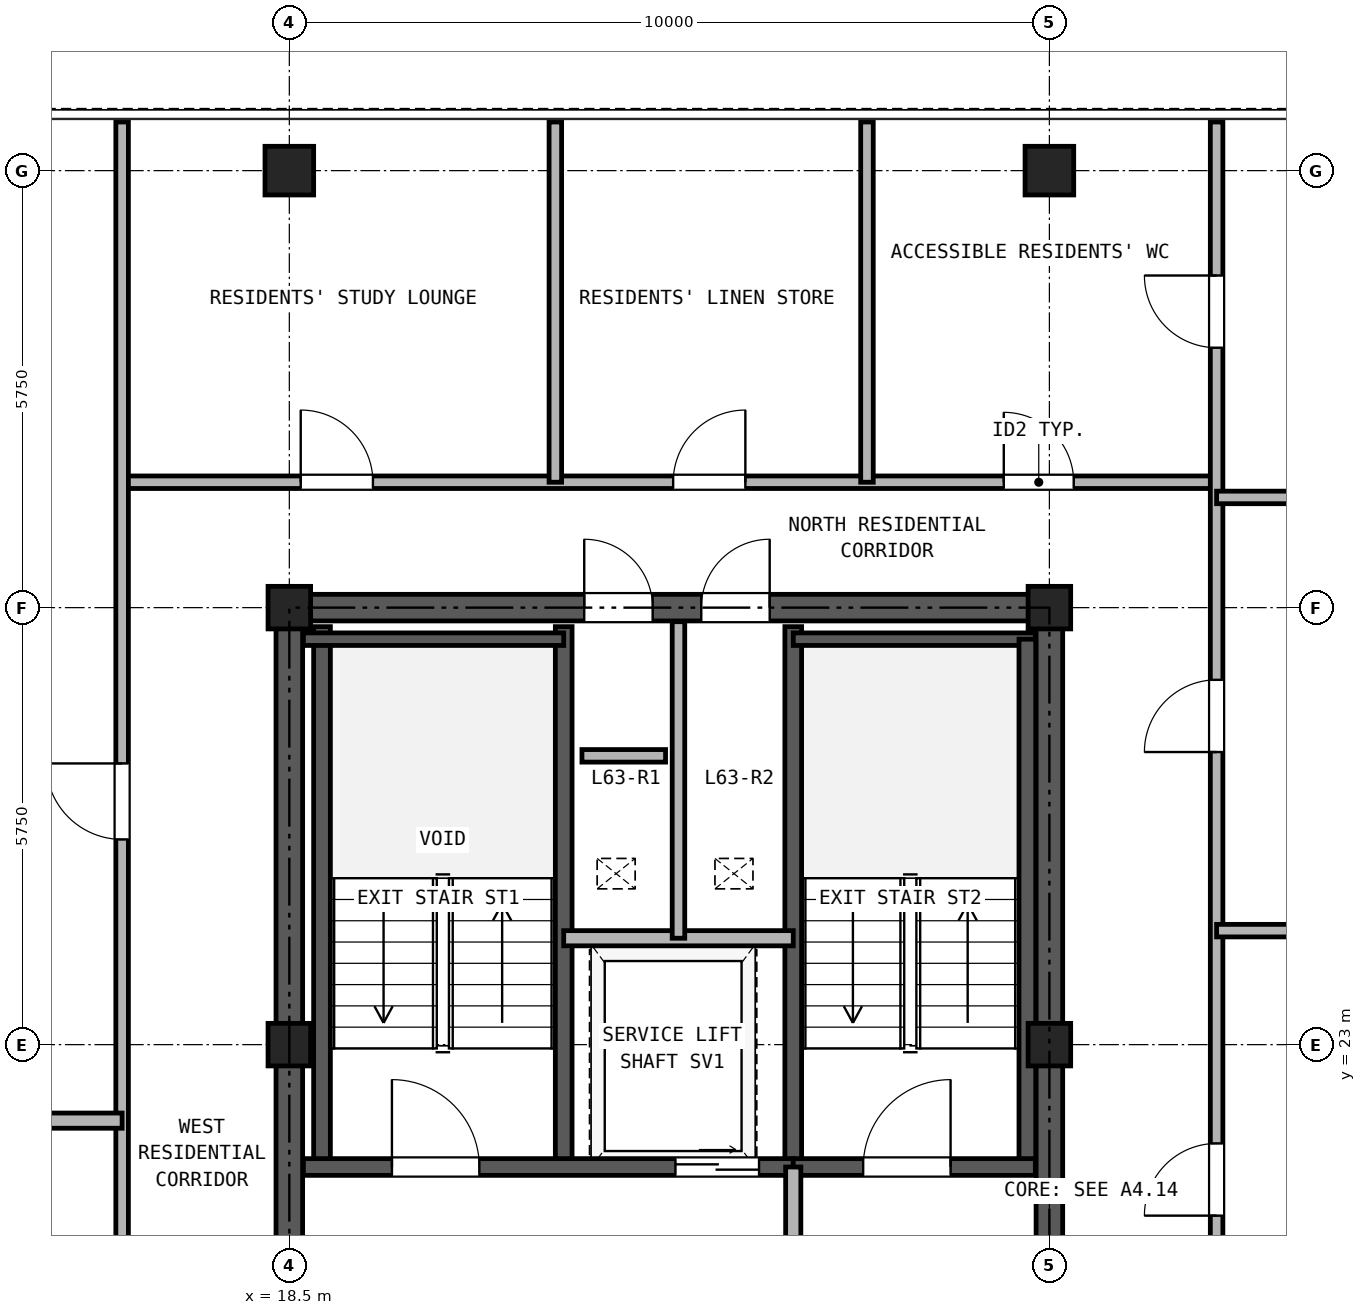
"""IFC4 building model, lengths in metres.
Left out: names, types, materials, properties, quantities, classifications, styles, units other than length and angle.
Written with IfcOpenShell. Run it as: python <this file> out.ifc"""

import sys

from ifc_helpers import new_model, si_unit, direction, frame, frame_2d, origin, origin_2d, place, context, subcontext, project, spatial, rectangle, hollow_rectangle, extrude, source, transform, mapped, element, fill, save


model = new_model("IFC4")
c1 = context("Model", 3, precision=1e-05, world=origin(), true_north=direction((0.0, 1.0)))
c2 = subcontext(c1, "Body", "Model", "MODEL_VIEW")
j1 = project(units=[si_unit("LENGTHUNIT", "METRE"), si_unit("PLANEANGLEUNIT", "RADIAN")], contexts=[c1])
p1 = place(None, origin())
s1 = spatial("IfcSite", under=j1, at=p1, CompositionType="ELEMENT")
p2 = place(p1, origin())
s2 = spatial("IfcBuilding", under=s1, at=p2, CompositionType="ELEMENT")
p3 = place(p2, frame((0.0, 0.0, 223.3)))
s3 = spatial("IfcBuildingStorey", under=s2, at=p3, CompositionType="ELEMENT", Elevation=223.3)
m1 = source(origin(), c2, "Body", "SweptSolid", [
    extrude(hollow_rectangle(XDim=0.64, YDim=0.64, WallThickness=0.035, at=origin_2d()), origin(), (0.0, 0.0, 1.0), 2.98),
])
for number, where, z_axis, x_axis in (
    (1, (18.5, 34.5, 0.0), (0.0, 0.0, 1.0), (1.0, 0.0, 0.0)),
    (2, (28.5, 34.5, 0.0), (0.0, 0.0, 1.0), (1.0, 0.0, 0.0)),
):
    element("IfcColumn", number, at=place(p3, frame(where, z_axis=z_axis, x_axis=x_axis)), inside=s3, PredefinedType="COLUMN", context=c2, shape_type="MappedRepresentation", body=[
        mapped(m1, transform((0.0, 0.0, 0.0), x_axis=(1.0, 0.0, 0.0), y_axis=(0.0, 1.0, 0.0), z_axis=(0.0, 0.0, 1.0), scale=1.0)),
    ])
m2 = source(origin(), c2, "Body", "SweptSolid", [
    extrude(hollow_rectangle(XDim=0.56, YDim=0.56, WallThickness=0.03, at=origin_2d()), origin(), (0.0, 0.0, 1.0), 2.98),
])
for number, where, z_axis, x_axis in (
    (3, (18.5, 23.0, 0.0), (0.0, 0.0, 1.0), (1.0, 0.0, 0.0)),
    (4, (18.5, 28.75, 0.0), (0.0, 0.0, 1.0), (1.0, 0.0, 0.0)),
    (5, (28.5, 23.0, 0.0), (0.0, 0.0, 1.0), (1.0, 0.0, 0.0)),
    (6, (28.5, 28.75, 0.0), (0.0, 0.0, 1.0), (1.0, 0.0, 0.0)),
):
    element("IfcColumn", number, at=place(p3, frame(where, z_axis=z_axis, x_axis=x_axis)), inside=s3, PredefinedType="COLUMN", context=c2, shape_type="MappedRepresentation", body=[
        mapped(m2, transform((0.0, 0.0, 0.0), x_axis=(1.0, 0.0, 0.0), y_axis=(0.0, 1.0, 0.0), z_axis=(0.0, 0.0, 1.0), scale=1.0)),
    ])
p4 = place(p3, frame((18.325, 28.75, 0.0), z_axis=(0.0, 0.0, 1.0), x_axis=(1.0, 0.0, 0.0)))
e7 = element("IfcWall", 7, at=p4, inside=s3, PredefinedType="SHEAR", context=c2, shape_type="SweptSolid", body=[
    extrude(rectangle(XDim=10.35, YDim=0.35, at=frame_2d((5.175, 0.0))), origin(), (0.0, 0.0, 1.0), 2.98),
])
p5 = place(p4, frame((4.055, 0.0, 0.0)))
e8 = element("IfcOpeningElement", 8, at=p5, cuts=e7, PredefinedType="OPENING", context=c2, shape_type="SweptSolid", body=[
    extrude(rectangle(XDim=0.9, YDim=2.05, at=frame_2d((0.45, 1.025))), frame((0.0, 0.185, 0.0), z_axis=(0.0, -1.0, 0.0), x_axis=(1.0, 0.0, 0.0)), (0.0, 0.0, 1.0), 0.37),
])
p6 = place(p4, frame((5.595, 0.0, 0.0)))
e9 = element("IfcOpeningElement", 9, at=p6, cuts=e7, PredefinedType="OPENING", context=c2, shape_type="SweptSolid", body=[
    extrude(rectangle(XDim=0.9, YDim=2.05, at=frame_2d((0.45, 1.025))), frame((0.0, 0.185, 0.0), z_axis=(0.0, -1.0, 0.0), x_axis=(1.0, 0.0, 0.0)), (0.0, 0.0, 1.0), 0.37),
])
p7 = place(p3, frame((18.5, 11.675, 0.0), z_axis=(0.0, 0.0, 1.0), x_axis=(0.0, 1.0, 0.0)))
e10 = element("IfcWall", 10, at=p7, inside=s3, PredefinedType="SHEAR", context=c2, shape_type="SweptSolid", body=[
    extrude(rectangle(XDim=16.9, YDim=0.35, at=frame_2d((8.45, 0.0))), origin(), (0.0, 0.0, 1.0), 2.98),
])
p8 = place(p7, frame((7.475, 0.0, 0.0)))
e11 = element("IfcOpeningElement", 11, at=p8, cuts=e10, PredefinedType="OPENING", context=c2, shape_type="SweptSolid", body=[
    extrude(rectangle(XDim=1.15, YDim=2.2, at=frame_2d((0.575, 1.1))), frame((0.0, 0.185, 0.0), z_axis=(0.0, -1.0, 0.0), x_axis=(1.0, 0.0, 0.0)), (0.0, 0.0, 1.0), 0.37),
])
p9 = place(p3, frame((28.5, 11.675, 0.0), z_axis=(0.0, 0.0, 1.0), x_axis=(0.0, 1.0, 0.0)))
e12 = element("IfcWall", 12, at=p9, inside=s3, PredefinedType="SHEAR", context=c2, shape_type="SweptSolid", body=[
    extrude(rectangle(XDim=16.9, YDim=0.35, at=frame_2d((8.45, 0.0))), origin(), (0.0, 0.0, 1.0), 2.98),
])
p10 = place(p9, frame((7.475, 0.0, 0.0)))
e13 = element("IfcOpeningElement", 13, at=p10, cuts=e12, PredefinedType="OPENING", context=c2, shape_type="SweptSolid", body=[
    extrude(rectangle(XDim=1.15, YDim=2.2, at=frame_2d((0.575, 1.1))), frame((0.0, 0.185, 0.0), z_axis=(0.0, -1.0, 0.0), x_axis=(1.0, 0.0, 0.0)), (0.0, 0.0, 1.0), 0.37),
])
for number, where, z_axis, x_axis in (
    (14, (18.93, 21.39, 0.0), (0.0, 0.0, 1.0), (0.0, 1.0, 0.0)),
    (15, (22.11, 21.39, 0.0), (0.0, 0.0, 1.0), (0.0, 1.0, 0.0)),
    (16, (25.13, 21.39, 0.0), (0.0, 0.0, 1.0), (0.0, 1.0, 0.0)),
):
    element("IfcWall", number, at=place(p3, frame(where, z_axis=z_axis, x_axis=x_axis)), inside=s3, PredefinedType="SOLIDWALL", context=c2, shape_type="SweptSolid", body=[
        extrude(rectangle(XDim=7.11, YDim=0.22, at=frame_2d((3.555, 0.0))), origin(), (0.0, 0.0, 1.0), 2.98),
    ])
p11 = place(p3, frame((18.685, 28.335, 0.0), z_axis=(0.0, 0.0, 1.0), x_axis=(1.0, 0.0, 0.0)))
e17 = element("IfcWall", 17, at=p11, inside=s3, PredefinedType="PARTITIONING", context=c2, shape_type="SweptSolid", body=[
    extrude(rectangle(XDim=3.425, YDim=0.165, at=frame_2d((1.712, 0.0))), origin(), (0.0, 0.0, 1.0), 2.98),
])
p12 = place(p3, frame((25.13, 28.335, 0.0), z_axis=(0.0, 0.0, 1.0), x_axis=(1.0, 0.0, 0.0)))
e18 = element("IfcWall", 18, at=p12, inside=s3, PredefinedType="PARTITIONING", context=c2, shape_type="SweptSolid", body=[
    extrude(rectangle(XDim=3.185, YDim=0.165, at=frame_2d((1.593, 0.0))), origin(), (0.0, 0.0, 1.0), 2.98),
])
p13 = place(p3, frame((28.21, 21.39, 0.0), z_axis=(0.0, 0.0, 1.0), x_axis=(0.0, 1.0, 0.0)))
e19 = element("IfcWall", 19, at=p13, inside=s3, PredefinedType="SOLIDWALL", context=c2, shape_type="SweptSolid", body=[
    extrude(rectangle(XDim=6.945, YDim=0.22, at=frame_2d((3.473, 0.0))), origin(), (0.0, 0.0, 1.0), 2.98),
])
p14 = place(p3, frame((18.685, 21.39, 0.0), z_axis=(0.0, 0.0, 1.0), x_axis=(1.0, 0.0, 0.0)))
e20 = element("IfcWall", 20, at=p14, inside=s3, PredefinedType="SOLIDWALL", context=c2, shape_type="SweptSolid", body=[
    extrude(rectangle(XDim=6.445, YDim=0.22, at=frame_2d((3.222, 0.0))), origin(), (0.0, 0.0, 1.0), 2.98),
])
p15 = place(p14, frame((1.165, 0.0, 0.0)))
e21 = element("IfcOpeningElement", 21, at=p15, cuts=e20, PredefinedType="OPENING", context=c2, shape_type="SweptSolid", body=[
    extrude(rectangle(XDim=1.15, YDim=2.2, at=frame_2d((0.575, 1.1))), frame((0.0, 0.12, 0.0), z_axis=(0.0, -1.0, 0.0), x_axis=(1.0, 0.0, 0.0)), (0.0, 0.0, 1.0), 0.24),
])
p16 = place(p14, frame((4.895, 0.0, 0.0)))
e22 = element("IfcOpeningElement", 22, at=p16, cuts=e20, PredefinedType="OPENING", context=c2, shape_type="SweptSolid", body=[
    extrude(rectangle(XDim=1.1, YDim=2.25, at=frame_2d((0.55, 1.125))), frame((0.0, 0.12, 0.0), z_axis=(0.0, -1.0, 0.0), x_axis=(1.0, 0.0, 0.0)), (0.0, 0.0, 1.0), 0.24),
])
p17 = place(p3, frame((25.13, 21.39, 0.0), z_axis=(0.0, 0.0, 1.0), x_axis=(1.0, 0.0, 0.0)))
e23 = element("IfcWall", 23, at=p17, inside=s3, PredefinedType="SOLIDWALL", context=c2, shape_type="SweptSolid", body=[
    extrude(rectangle(XDim=3.185, YDim=0.22, at=frame_2d((1.593, 0.0))), origin(), (0.0, 0.0, 1.0), 2.98),
])
p18 = place(p17, frame((0.92, 0.0, 0.0)))
e24 = element("IfcOpeningElement", 24, at=p18, cuts=e23, PredefinedType="OPENING", context=c2, shape_type="SweptSolid", body=[
    extrude(rectangle(XDim=1.15, YDim=2.2, at=frame_2d((0.575, 1.1))), frame((0.0, 0.12, 0.0), z_axis=(0.0, -1.0, 0.0), x_axis=(1.0, 0.0, 0.0)), (0.0, 0.0, 1.0), 0.24),
])
p19 = place(p3, frame((22.11, 24.4, 0.0), z_axis=(0.0, 0.0, 1.0), x_axis=(1.0, 0.0, 0.0)))
e25 = element("IfcWall", 25, at=p19, inside=s3, PredefinedType="PARTITIONING", context=c2, shape_type="SweptSolid", body=[
    extrude(rectangle(XDim=3.02, YDim=0.2, at=frame_2d((1.51, 0.0))), origin(), (0.0, 0.0, 1.0), 2.98),
])
p20 = place(p3, frame((23.62, 24.4, 0.0), z_axis=(0.0, 0.0, 1.0), x_axis=(0.0, 1.0, 0.0)))
e26 = element("IfcWall", 26, at=p20, inside=s3, PredefinedType="PARTITIONING", context=c2, shape_type="SweptSolid", body=[
    extrude(rectangle(XDim=4.165, YDim=0.165, at=frame_2d((2.083, 0.0))), origin(), (0.0, 0.0, 1.0), 2.98),
])
p21 = place(p3, frame((25.13, 18.0, 0.0), z_axis=(0.0, 0.0, 1.0), x_axis=(0.0, 1.0, 0.0)))
e27 = element("IfcWall", 27, at=p21, inside=s3, PredefinedType="PARTITIONING", context=c2, shape_type="SweptSolid", body=[
    extrude(rectangle(XDim=3.39, YDim=0.2, at=frame_2d((1.695, 0.0))), origin(), (0.0, 0.0, 1.0), 2.98),
])
p22 = place(p21, frame((1.1, 0.0, 0.0)))
e28 = element("IfcOpeningElement", 28, at=p22, cuts=e27, PredefinedType="OPENING", context=c2, shape_type="SweptSolid", body=[
    extrude(rectangle(XDim=1.15, YDim=2.2, at=frame_2d((0.575, 1.1))), frame((0.0, 0.11, 0.0), z_axis=(0.0, -1.0, 0.0), x_axis=(1.0, 0.0, 0.0)), (0.0, 0.0, 1.0), 0.22),
])
p23 = place(p3, frame((16.3, 30.4, 0.0), z_axis=(0.0, 0.0, 1.0), x_axis=(1.0, 0.0, 0.0)))
e29 = element("IfcWall", 29, at=p23, inside=s3, PredefinedType="PARTITIONING", context=c2, shape_type="SweptSolid", body=[
    extrude(rectangle(XDim=14.4, YDim=0.165, at=frame_2d((7.2, 0.0))), origin(), (0.0, 0.0, 1.0), 2.98),
])
p24 = place(p23, frame((2.35, 0.0, 0.0)))
e30 = element("IfcOpeningElement", 30, at=p24, cuts=e29, PredefinedType="OPENING", context=c2, shape_type="SweptSolid", body=[
    extrude(rectangle(XDim=0.95, YDim=2.15, at=frame_2d((0.475, 1.075))), frame((0.0, 0.093, 0.0), z_axis=(0.0, -1.0, 0.0), x_axis=(1.0, 0.0, 0.0)), (0.0, 0.0, 1.0), 0.185),
])
p25 = place(p23, frame((7.25, 0.0, 0.0)))
e31 = element("IfcOpeningElement", 31, at=p25, cuts=e29, PredefinedType="OPENING", context=c2, shape_type="SweptSolid", body=[
    extrude(rectangle(XDim=0.95, YDim=2.15, at=frame_2d((0.475, 1.075))), frame((0.0, 0.093, 0.0), z_axis=(0.0, -1.0, 0.0), x_axis=(1.0, 0.0, 0.0)), (0.0, 0.0, 1.0), 0.185),
])
p26 = place(p23, frame((11.6, 0.0, 0.0)))
e32 = element("IfcOpeningElement", 32, at=p26, cuts=e29, PredefinedType="OPENING", context=c2, shape_type="SweptSolid", body=[
    extrude(rectangle(XDim=0.92, YDim=2.1, at=frame_2d((0.46, 1.05))), frame((0.0, 0.093, 0.0), z_axis=(0.0, -1.0, 0.0), x_axis=(1.0, 0.0, 0.0)), (0.0, 0.0, 1.0), 0.185),
])
p27 = place(p3, frame((16.3, 10.9, 0.0), z_axis=(0.0, 0.0, 1.0), x_axis=(0.0, 1.0, 0.0)))
e33 = element("IfcWall", 33, at=p27, inside=s3, PredefinedType="PARTITIONING", context=c2, shape_type="SweptSolid", body=[
    extrude(rectangle(XDim=24.24, YDim=0.165, at=frame_2d((12.12, 0.0))), origin(), (0.0, 0.0, 1.0), 2.98),
])
p28 = place(p27, frame((5.05, 0.0, 0.0)))
e34 = element("IfcOpeningElement", 34, at=p28, cuts=e33, PredefinedType="OPENING", context=c2, shape_type="SweptSolid", body=[
    extrude(rectangle(XDim=1.0, YDim=2.15, at=frame_2d((0.5, 1.075))), frame((0.0, 0.093, 0.0), z_axis=(0.0, -1.0, 0.0), x_axis=(1.0, 0.0, 0.0)), (0.0, 0.0, 1.0), 0.185),
])
p29 = place(p27, frame((14.8, 0.0, 0.0)))
e35 = element("IfcOpeningElement", 35, at=p29, cuts=e33, PredefinedType="OPENING", context=c2, shape_type="SweptSolid", body=[
    extrude(rectangle(XDim=1.0, YDim=2.15, at=frame_2d((0.5, 1.075))), frame((0.0, 0.093, 0.0), z_axis=(0.0, -1.0, 0.0), x_axis=(1.0, 0.0, 0.0)), (0.0, 0.0, 1.0), 0.185),
])
p30 = place(p3, frame((30.7, 10.9, 0.0), z_axis=(0.0, 0.0, 1.0), x_axis=(0.0, 1.0, 0.0)))
e36 = element("IfcWall", 36, at=p30, inside=s3, PredefinedType="PARTITIONING", context=c2, shape_type="SweptSolid", body=[
    extrude(rectangle(XDim=24.24, YDim=0.165, at=frame_2d((12.12, 0.0))), origin(), (0.0, 0.0, 1.0), 2.98),
])
p31 = place(p30, frame((3.05, 0.0, 0.0)))
e37 = element("IfcOpeningElement", 37, at=p31, cuts=e36, PredefinedType="OPENING", context=c2, shape_type="SweptSolid", body=[
    extrude(rectangle(XDim=0.95, YDim=2.15, at=frame_2d((0.475, 1.075))), frame((0.0, 0.093, 0.0), z_axis=(0.0, -1.0, 0.0), x_axis=(1.0, 0.0, 0.0)), (0.0, 0.0, 1.0), 0.185),
])
p32 = place(p30, frame((9.85, 0.0, 0.0)))
e38 = element("IfcOpeningElement", 38, at=p32, cuts=e36, PredefinedType="OPENING", context=c2, shape_type="SweptSolid", body=[
    extrude(rectangle(XDim=0.95, YDim=2.15, at=frame_2d((0.475, 1.075))), frame((0.0, 0.093, 0.0), z_axis=(0.0, -1.0, 0.0), x_axis=(1.0, 0.0, 0.0)), (0.0, 0.0, 1.0), 0.185),
])
p33 = place(p30, frame((15.95, 0.0, 0.0)))
e39 = element("IfcOpeningElement", 39, at=p33, cuts=e36, PredefinedType="OPENING", context=c2, shape_type="SweptSolid", body=[
    extrude(rectangle(XDim=0.95, YDim=2.15, at=frame_2d((0.475, 1.075))), frame((0.0, 0.093, 0.0), z_axis=(0.0, -1.0, 0.0), x_axis=(1.0, 0.0, 0.0)), (0.0, 0.0, 1.0), 0.185),
])
p34 = place(p30, frame((21.27, 0.0, 0.0)))
e40 = element("IfcOpeningElement", 40, at=p34, cuts=e36, PredefinedType="OPENING", context=c2, shape_type="SweptSolid", body=[
    extrude(rectangle(XDim=0.95, YDim=2.15, at=frame_2d((0.475, 1.075))), frame((0.0, 0.093, 0.0), z_axis=(0.0, -1.0, 0.0), x_axis=(1.0, 0.0, 0.0)), (0.0, 0.0, 1.0), 0.185),
])
p35 = place(p3, frame((5.36, 22.0, 0.0), z_axis=(0.0, 0.0, 1.0), x_axis=(1.0, 0.0, 0.0)))
e41 = element("IfcWall", 41, at=p35, inside=s3, PredefinedType="PARTITIONING", context=c2, shape_type="SweptSolid", body=[
    extrude(rectangle(XDim=10.94, YDim=0.2, at=frame_2d((5.47, 0.0))), origin(), (0.0, 0.0, 1.0), 2.98),
])
for number, where, z_axis, x_axis in (
    (42, (30.7, 24.5, 0.0), (0.0, 0.0, 1.0), (1.0, 0.0, 0.0)),
    (43, (30.7, 30.2, 0.0), (0.0, 0.0, 1.0), (1.0, 0.0, 0.0)),
):
    element("IfcWall", number, at=place(p3, frame(where, z_axis=z_axis, x_axis=x_axis)), inside=s3, PredefinedType="PARTITIONING", context=c2, shape_type="SweptSolid", body=[
        extrude(rectangle(XDim=10.94, YDim=0.165, at=frame_2d((5.47, 0.0))), origin(), (0.0, 0.0, 1.0), 2.98),
    ])
for number, where, z_axis, x_axis in (
    (44, (22.0, 30.4, 0.0), (0.0, 0.0, 1.0), (0.0, 1.0, 0.0)),
    (45, (26.1, 30.4, 0.0), (0.0, 0.0, 1.0), (0.0, 1.0, 0.0)),
):
    element("IfcWall", number, at=place(p3, frame(where, z_axis=z_axis, x_axis=x_axis)), inside=s3, PredefinedType="PARTITIONING", context=c2, shape_type="SweptSolid", body=[
        extrude(rectangle(XDim=4.74, YDim=0.165, at=frame_2d((2.37, 0.0))), origin(), (0.0, 0.0, 1.0), 2.98),
    ])
p36 = place(p3, frame((22.35, 26.8, 0.0), z_axis=(0.0, 0.0, 1.0), x_axis=(1.0, 0.0, 0.0)))
e46 = element("IfcWall", 46, at=p36, inside=s3, PredefinedType="PARTITIONING", context=c2, shape_type="SweptSolid", body=[
    extrude(rectangle(XDim=1.1, YDim=0.165, at=frame_2d((0.55, 0.0))), origin(), (0.0, 0.0, 1.0), 2.98),
])
p37 = place(p15, frame((1.15, 0.0, 0.0), z_axis=(0.0, 0.0, 1.0), x_axis=(-1.0, 0.0, 0.0)))
e47 = element("IfcDoor", 47, at=p37, inside=s3, OperationType="SINGLE_SWING_LEFT", PredefinedType="DOOR", context=c2, shape_type="SweptSolid", body=[
    extrude(rectangle(XDim=1.15, YDim=2.2, at=frame_2d((0.575, 1.1))), frame((0.0, 0.025, 0.0), z_axis=(0.0, -1.0, 0.0), x_axis=(1.0, 0.0, 0.0)), (0.0, 0.0, 1.0), 0.05),
])
fill(e21, e47)
p38 = place(p18, frame((1.15, 0.0, 0.0), z_axis=(0.0, 0.0, 1.0), x_axis=(-1.0, 0.0, 0.0)))
e48 = element("IfcDoor", 48, at=p38, inside=s3, OperationType="SINGLE_SWING_RIGHT", PredefinedType="DOOR", context=c2, shape_type="SweptSolid", body=[
    extrude(rectangle(XDim=1.15, YDim=2.2, at=frame_2d((0.575, 1.1))), frame((0.0, 0.025, 0.0), z_axis=(0.0, -1.0, 0.0), x_axis=(1.0, 0.0, 0.0)), (0.0, 0.0, 1.0), 0.05),
])
fill(e24, e48)
p39 = place(p16, frame((1.1, 0.0, 0.0), z_axis=(0.0, 0.0, 1.0), x_axis=(-1.0, 0.0, 0.0)))
e49 = element("IfcDoor", 49, at=p39, inside=s3, OperationType="DOUBLE_DOOR_SLIDING", PredefinedType="DOOR", context=c2, shape_type="SweptSolid", body=[
    extrude(rectangle(XDim=1.1, YDim=2.25, at=frame_2d((0.55, 1.125))), frame((0.0, 0.025, 0.0), z_axis=(0.0, -1.0, 0.0), x_axis=(1.0, 0.0, 0.0)), (0.0, 0.0, 1.0), 0.05),
])
fill(e22, e49)
p40 = place(p5, origin())
e50 = element("IfcDoor", 50, at=p40, inside=s3, OperationType="SINGLE_SWING_LEFT", PredefinedType="DOOR", context=c2, shape_type="SweptSolid", body=[
    extrude(rectangle(XDim=0.9, YDim=2.05, at=frame_2d((0.45, 1.025))), frame((0.0, 0.025, 0.0), z_axis=(0.0, -1.0, 0.0), x_axis=(1.0, 0.0, 0.0)), (0.0, 0.0, 1.0), 0.05),
])
fill(e8, e50)
p41 = place(p6, origin())
e51 = element("IfcDoor", 51, at=p41, inside=s3, OperationType="SINGLE_SWING_RIGHT", PredefinedType="DOOR", context=c2, shape_type="SweptSolid", body=[
    extrude(rectangle(XDim=0.9, YDim=2.05, at=frame_2d((0.45, 1.025))), frame((0.0, 0.025, 0.0), z_axis=(0.0, -1.0, 0.0), x_axis=(1.0, 0.0, 0.0)), (0.0, 0.0, 1.0), 0.05),
])
fill(e9, e51)
p42 = place(p29, origin())
e52 = element("IfcDoor", 52, at=p42, inside=s3, OperationType="SINGLE_SWING_RIGHT", PredefinedType="DOOR", context=c2, shape_type="SweptSolid", body=[
    extrude(rectangle(XDim=1.0, YDim=2.15, at=frame_2d((0.5, 1.075))), frame((0.0, 0.025, 0.0), z_axis=(0.0, -1.0, 0.0), x_axis=(1.0, 0.0, 0.0)), (0.0, 0.0, 1.0), 0.05),
])
fill(e35, e52)
p43 = place(p32, origin())
e53 = element("IfcDoor", 53, at=p43, inside=s3, OperationType="SINGLE_SWING_LEFT", PredefinedType="DOOR", context=c2, shape_type="SweptSolid", body=[
    extrude(rectangle(XDim=0.95, YDim=2.15, at=frame_2d((0.475, 1.075))), frame((0.0, 0.025, 0.0), z_axis=(0.0, -1.0, 0.0), x_axis=(1.0, 0.0, 0.0)), (0.0, 0.0, 1.0), 0.05),
])
fill(e38, e53)
p44 = place(p33, origin())
e54 = element("IfcDoor", 54, at=p44, inside=s3, OperationType="SINGLE_SWING_LEFT", PredefinedType="DOOR", context=c2, shape_type="SweptSolid", body=[
    extrude(rectangle(XDim=0.95, YDim=2.15, at=frame_2d((0.475, 1.075))), frame((0.0, 0.025, 0.0), z_axis=(0.0, -1.0, 0.0), x_axis=(1.0, 0.0, 0.0)), (0.0, 0.0, 1.0), 0.05),
])
fill(e39, e54)
p45 = place(p34, origin())
e55 = element("IfcDoor", 55, at=p45, inside=s3, OperationType="SINGLE_SWING_RIGHT", PredefinedType="DOOR", context=c2, shape_type="SweptSolid", body=[
    extrude(rectangle(XDim=0.95, YDim=2.15, at=frame_2d((0.475, 1.075))), frame((0.0, 0.025, 0.0), z_axis=(0.0, -1.0, 0.0), x_axis=(1.0, 0.0, 0.0)), (0.0, 0.0, 1.0), 0.05),
])
fill(e40, e55)
p46 = place(p24, origin())
e56 = element("IfcDoor", 56, at=p46, inside=s3, OperationType="SINGLE_SWING_LEFT", PredefinedType="DOOR", context=c2, shape_type="SweptSolid", body=[
    extrude(rectangle(XDim=0.95, YDim=2.15, at=frame_2d((0.475, 1.075))), frame((0.0, 0.025, 0.0), z_axis=(0.0, -1.0, 0.0), x_axis=(1.0, 0.0, 0.0)), (0.0, 0.0, 1.0), 0.05),
])
fill(e30, e56)
p47 = place(p25, origin())
e57 = element("IfcDoor", 57, at=p47, inside=s3, OperationType="SINGLE_SWING_RIGHT", PredefinedType="DOOR", context=c2, shape_type="SweptSolid", body=[
    extrude(rectangle(XDim=0.95, YDim=2.15, at=frame_2d((0.475, 1.075))), frame((0.0, 0.025, 0.0), z_axis=(0.0, -1.0, 0.0), x_axis=(1.0, 0.0, 0.0)), (0.0, 0.0, 1.0), 0.05),
])
fill(e31, e57)
p48 = place(p26, origin())
e58 = element("IfcDoor", 58, at=p48, inside=s3, OperationType="SINGLE_SWING_LEFT", PredefinedType="DOOR", context=c2, shape_type="SweptSolid", body=[
    extrude(rectangle(XDim=0.92, YDim=2.1, at=frame_2d((0.46, 1.05))), frame((0.0, 0.025, 0.0), z_axis=(0.0, -1.0, 0.0), x_axis=(1.0, 0.0, 0.0)), (0.0, 0.0, 1.0), 0.05),
])
fill(e32, e58)
save(model, sys.argv[1])
